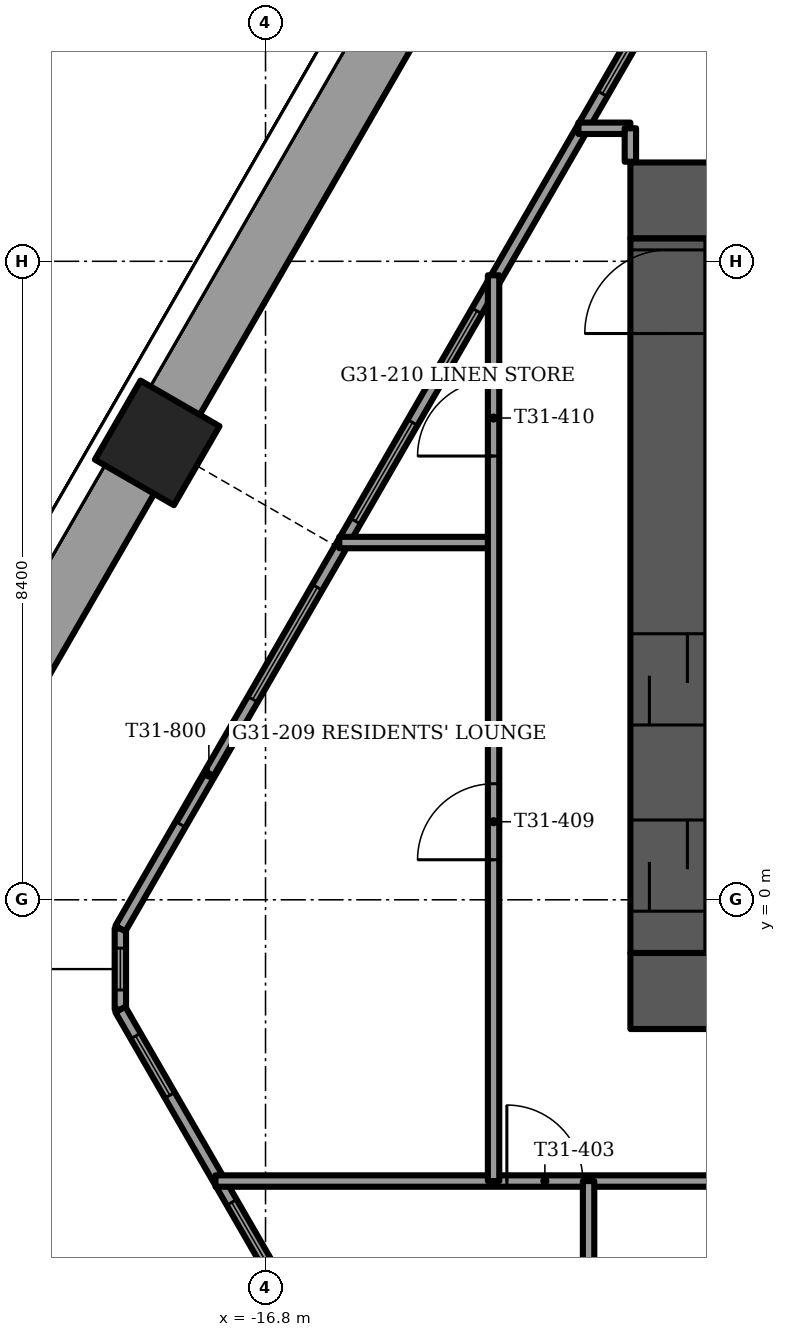
"""IFC4 building model, lengths in metres.
Left out: names, types, materials, properties, quantities, classifications, styles, units other than length and angle.
Written with IfcOpenShell. Run it as: python <this file> out.ifc"""

import sys

from ifc_helpers import new_model, si_unit, direction, frame, frame_2d, origin, origin_2d, place, context, subcontext, project, spatial, rectangle, extrude, element, fill, save


model = new_model("IFC4")
c1 = context("Model", 3, precision=1e-05, world=origin(), true_north=direction((0.0, 1.0)))
c2 = subcontext(c1, "Body", "Model", "MODEL_VIEW")
j1 = project(units=[si_unit("LENGTHUNIT", "METRE"), si_unit("PLANEANGLEUNIT", "RADIAN")], contexts=[c1])
p1 = place(None, origin())
s1 = spatial("IfcSite", under=j1, at=p1, CompositionType="ELEMENT")
p2 = place(p1, origin())
s2 = spatial("IfcBuilding", under=s1, at=p2, CompositionType="ELEMENT")
p3 = place(p2, frame((0.0, 0.0, 127.25)))
s3 = spatial("IfcBuildingStorey", under=s2, at=p3, CompositionType="ELEMENT", Elevation=127.25)
p4 = place(p3, frame((-18.225, 6.011, -1.2), z_axis=(0.0, 0.0, 1.0), x_axis=(0.5, 0.866025403784, 0.0)))
e1 = element("IfcColumn", 1, at=p4, inside=s3, PredefinedType="COLUMN", context=c2, shape_type="SweptSolid", body=[
    extrude(rectangle(XDim=1.2, YDim=1.2, at=origin_2d()), origin(), (0.0, 0.0, 1.0), 3.75),
])
p5 = place(p3, frame((-12.0, -1.2, -0.3), z_axis=(0.0, 0.0, 1.0), x_axis=(1.0, 0.0, 0.0)))
e2 = element("IfcWall", 2, at=p5, inside=s3, PredefinedType="SHEAR", context=c2, shape_type="SweptSolid", body=[
    extrude(rectangle(XDim=24.0, YDim=1.0, at=frame_2d((12.0, 0.0))), origin(), (0.0, 0.0, 1.0), 3.75),
])
p6 = place(p5, frame((11.2, 0.0, 0.0)))
e3 = element("IfcOpeningElement", 3, at=p6, cuts=e2, PredefinedType="OPENING", context=c2, shape_type="SweptSolid", body=[
    extrude(rectangle(XDim=1.6, YDim=2.1, at=frame_2d((0.8, 1.05))), frame((0.0, 0.5, 0.0), z_axis=(0.0, -1.0, 0.0), x_axis=(1.0, 0.0, 0.0)), (0.0, 0.0, 1.0), 1.0),
])
p7 = place(p3, frame((-12.0, 9.2, -0.3), z_axis=(0.0, 0.0, 1.0), x_axis=(1.0, 0.0, 0.0)))
e4 = element("IfcWall", 4, at=p7, inside=s3, PredefinedType="SHEAR", context=c2, shape_type="SweptSolid", body=[
    extrude(rectangle(XDim=24.0, YDim=1.0, at=frame_2d((12.0, 0.0))), origin(), (0.0, 0.0, 1.0), 3.75),
])
p8 = place(p7, frame((11.2, 0.0, 0.0)))
e5 = element("IfcOpeningElement", 5, at=p8, cuts=e4, PredefinedType="OPENING", context=c2, shape_type="SweptSolid", body=[
    extrude(rectangle(XDim=1.6, YDim=2.1, at=frame_2d((0.8, 1.05))), frame((0.0, 0.5, 0.0), z_axis=(0.0, -1.0, 0.0), x_axis=(1.0, 0.0, 0.0)), (0.0, 0.0, 1.0), 1.0),
])
p9 = place(p7, frame((5.25, 0.0, 0.0)))
e6 = element("IfcOpeningElement", 6, at=p9, cuts=e4, PredefinedType="OPENING", context=c2, shape_type="SweptSolid", body=[
    extrude(rectangle(XDim=1.1, YDim=2.1, at=frame_2d((0.55, 1.05))), frame((0.0, 0.5, 0.0), z_axis=(0.0, -1.0, 0.0), x_axis=(1.0, 0.0, 0.0)), (0.0, 0.0, 1.0), 1.0),
])
p10 = place(p7, frame((17.65, 0.0, 0.0)))
e7 = element("IfcOpeningElement", 7, at=p10, cuts=e4, PredefinedType="OPENING", context=c2, shape_type="SweptSolid", body=[
    extrude(rectangle(XDim=1.1, YDim=2.1, at=frame_2d((0.55, 1.05))), frame((0.0, 0.5, 0.0), z_axis=(0.0, -1.0, 0.0), x_axis=(1.0, 0.0, 0.0)), (0.0, 0.0, 1.0), 1.0),
])
p11 = place(p3, frame((-11.5, -0.7, -0.3), z_axis=(0.0, 0.0, 1.0), x_axis=(0.0, 1.0, 0.0)))
e8 = element("IfcWall", 8, at=p11, inside=s3, PredefinedType="SHEAR", context=c2, shape_type="SweptSolid", body=[
    extrude(rectangle(XDim=9.4, YDim=1.0, at=frame_2d((4.7, 0.0))), origin(), (0.0, 0.0, 1.0), 3.75),
])
p12 = place(p11, frame((8.15, 0.0, 0.0)))
e9 = element("IfcOpeningElement", 9, at=p12, cuts=e8, PredefinedType="OPENING", context=c2, shape_type="SweptSolid", body=[
    extrude(rectangle(XDim=1.1, YDim=2.1, at=frame_2d((0.55, 1.05))), frame((0.0, 0.5, 0.0), z_axis=(0.0, -1.0, 0.0), x_axis=(1.0, 0.0, 0.0)), (0.0, 0.0, 1.0), 1.0),
])
p13 = place(p11, frame((0.55, 0.0, 0.0)))
e10 = element("IfcOpeningElement", 10, at=p13, cuts=e8, PredefinedType="OPENING", context=c2, shape_type="SweptSolid", body=[
    extrude(rectangle(XDim=1.2, YDim=2.1, at=frame_2d((0.6, 1.05))), frame((0.0, 0.5, 0.0), z_axis=(0.0, -1.0, 0.0), x_axis=(1.0, 0.0, 0.0)), (0.0, 0.0, 1.0), 1.0),
])
p14 = place(p11, frame((3.0, 0.0, 0.0)))
e11 = element("IfcOpeningElement", 11, at=p14, cuts=e8, PredefinedType="OPENING", context=c2, shape_type="SweptSolid", body=[
    extrude(rectangle(XDim=1.2, YDim=2.1, at=frame_2d((0.6, 1.05))), frame((0.0, 0.5, 0.0), z_axis=(0.0, -1.0, 0.0), x_axis=(1.0, 0.0, 0.0)), (0.0, 0.0, 1.0), 1.0),
])
p15 = place(p3, frame((-14.733, 12.359, 0.0), z_axis=(0.0, 0.0, 1.0), x_axis=(-0.499999023957, -0.866025967302, 0.0)))
e12 = element("IfcWall", 12, at=p15, inside=s3, PredefinedType="PARAPET", context=c2, shape_type="SweptSolid", body=[
    extrude(rectangle(XDim=6.673, YDim=0.9, at=frame_2d((3.337, 0.0))), origin(), (0.0, 0.0, 1.0), 1.1),
])
p16 = place(p3, frame((-18.64, 5.593, 0.0), z_axis=(0.0, 0.0, 1.0), x_axis=(-0.500001814021, -0.866024356456, 0.0)))
e13 = element("IfcWall", 13, at=p16, inside=s3, PredefinedType="PARAPET", context=c2, shape_type="SweptSolid", body=[
    extrude(rectangle(XDim=6.859, YDim=0.9, at=frame_2d((3.429, 0.0))), origin(), (0.0, 0.0, 1.0), 1.1),
])
p17 = place(p3, frame((-22.069, -1.475, 0.0), z_axis=(0.0, 0.0, 1.0), x_axis=(0.499982573574, -0.866035464703, 0.0)))
e14 = element("IfcWall", 14, at=p17, inside=s3, PredefinedType="PARAPET", context=c2, shape_type="SweptSolid", body=[
    extrude(rectangle(XDim=5.281, YDim=0.9, at=frame_2d((2.641, 0.0))), origin(), (0.0, 0.0, 1.0), 1.1),
])
p18 = place(p3, frame((-7.642, 18.792, 0.0), z_axis=(0.0, 0.0, 1.0), x_axis=(-0.500001219746, -0.866024699562, 0.0)))
e15 = element("IfcWall", 15, at=p18, inside=s3, PredefinedType="SOLIDWALL", context=c2, shape_type="SweptSolid", body=[
    extrude(rectangle(XDim=22.137, YDim=0.15, at=frame_2d((11.068, 0.0))), origin(), (0.0, 0.0, 1.0), 3.45),
])
p19 = place(p18, frame((4.354, 0.0, 0.15)))
e16 = element("IfcOpeningElement", 16, at=p19, cuts=e15, PredefinedType="OPENING", context=c2, shape_type="SweptSolid", body=[
    extrude(rectangle(XDim=0.9, YDim=2.85, at=frame_2d((0.45, 1.425))), frame((0.0, 0.075, 0.0), z_axis=(0.0, -1.0, 0.0), x_axis=(1.0, 0.0, 0.0)), (0.0, 0.0, 1.0), 0.15),
])
p20 = place(p18, frame((6.454, 0.0, 0.15)))
e17 = element("IfcOpeningElement", 17, at=p20, cuts=e15, PredefinedType="OPENING", context=c2, shape_type="SweptSolid", body=[
    extrude(rectangle(XDim=1.5, YDim=2.85, at=frame_2d((0.75, 1.425))), frame((0.0, 0.075, 0.0), z_axis=(0.0, -1.0, 0.0), x_axis=(1.0, 0.0, 0.0)), (0.0, 0.0, 1.0), 0.15),
])
p21 = place(p18, frame((8.554, 0.0, 0.15)))
e18 = element("IfcOpeningElement", 18, at=p21, cuts=e15, PredefinedType="OPENING", context=c2, shape_type="SweptSolid", body=[
    extrude(rectangle(XDim=0.9, YDim=2.85, at=frame_2d((0.45, 1.425))), frame((0.0, 0.075, 0.0), z_axis=(0.0, -1.0, 0.0), x_axis=(1.0, 0.0, 0.0)), (0.0, 0.0, 1.0), 0.15),
])
p22 = place(p18, frame((12.754, 0.0, 0.15)))
e19 = element("IfcOpeningElement", 19, at=p22, cuts=e15, PredefinedType="OPENING", context=c2, shape_type="SweptSolid", body=[
    extrude(rectangle(XDim=0.9, YDim=2.85, at=frame_2d((0.45, 1.425))), frame((0.0, 0.075, 0.0), z_axis=(0.0, -1.0, 0.0), x_axis=(1.0, 0.0, 0.0)), (0.0, 0.0, 1.0), 0.15),
])
p23 = place(p18, frame((14.449, 0.0, 0.15)))
e20 = element("IfcOpeningElement", 20, at=p23, cuts=e15, PredefinedType="OPENING", context=c2, shape_type="SweptSolid", body=[
    extrude(rectangle(XDim=1.5, YDim=2.85, at=frame_2d((0.75, 1.425))), frame((0.0, 0.075, 0.0), z_axis=(0.0, -1.0, 0.0), x_axis=(1.0, 0.0, 0.0)), (0.0, 0.0, 1.0), 0.15),
])
p24 = place(p18, frame((16.954, 0.0, 0.15)))
e21 = element("IfcOpeningElement", 21, at=p24, cuts=e15, PredefinedType="OPENING", context=c2, shape_type="SweptSolid", body=[
    extrude(rectangle(XDim=1.7, YDim=2.85, at=frame_2d((0.85, 1.425))), frame((0.0, 0.075, 0.0), z_axis=(0.0, -1.0, 0.0), x_axis=(1.0, 0.0, 0.0)), (0.0, 0.0, 1.0), 0.15),
])
p25 = place(p18, frame((19.054, 0.0, 0.0)))
e22 = element("IfcOpeningElement", 22, at=p25, cuts=e15, PredefinedType="OPENING", context=c2, shape_type="SweptSolid", body=[
    extrude(rectangle(XDim=1.5, YDim=2.4, at=frame_2d((0.75, 1.2))), frame((0.0, 0.075, 0.0), z_axis=(0.0, -1.0, 0.0), x_axis=(1.0, 0.0, 0.0)), (0.0, 0.0, 1.0), 0.15),
])
p26 = place(p18, frame((1.021, 0.0, 0.15)))
e23 = element("IfcOpeningElement", 23, at=p26, cuts=e15, PredefinedType="OPENING", context=c2, shape_type="SweptSolid", body=[
    extrude(rectangle(XDim=1.7, YDim=2.73, at=frame_2d((0.85, 1.365))), frame((0.0, 0.075, 0.0), z_axis=(0.0, -1.0, 0.0), x_axis=(1.0, 0.0, 0.0)), (0.0, 0.0, 1.0), 0.15),
])
p27 = place(p3, frame((-18.71, -1.444, 0.0), z_axis=(0.0, 0.0, 1.0), x_axis=(0.500010582961, -0.866019293623, 0.0)))
e24 = element("IfcWall", 24, at=p27, inside=s3, PredefinedType="SOLIDWALL", context=c2, shape_type="SweptSolid", body=[
    extrude(rectangle(XDim=16.21, YDim=0.15, at=frame_2d((8.105, 0.0))), origin(), (0.0, 0.0, 1.0), 3.45),
])
p28 = place(p27, frame((2.93, 0.0, 0.15)))
e25 = element("IfcOpeningElement", 25, at=p28, cuts=e24, PredefinedType="OPENING", context=c2, shape_type="SweptSolid", body=[
    extrude(rectangle(XDim=0.9, YDim=2.85, at=frame_2d((0.45, 1.425))), frame((0.0, 0.075, 0.0), z_axis=(0.0, -1.0, 0.0), x_axis=(1.0, 0.0, 0.0)), (0.0, 0.0, 1.0), 0.15),
])
p29 = place(p27, frame((4.205, 0.0, 0.0)))
e26 = element("IfcOpeningElement", 26, at=p29, cuts=e24, PredefinedType="OPENING", context=c2, shape_type="SweptSolid", body=[
    extrude(rectangle(XDim=1.5, YDim=2.4, at=frame_2d((0.75, 1.2))), frame((0.0, 0.075, 0.0), z_axis=(0.0, -1.0, 0.0), x_axis=(1.0, 0.0, 0.0)), (0.0, 0.0, 1.0), 0.15),
])
p30 = place(p27, frame((6.305, 0.0, 0.15)))
e27 = element("IfcOpeningElement", 27, at=p30, cuts=e24, PredefinedType="OPENING", context=c2, shape_type="SweptSolid", body=[
    extrude(rectangle(XDim=1.7, YDim=2.85, at=frame_2d((0.85, 1.425))), frame((0.0, 0.075, 0.0), z_axis=(0.0, -1.0, 0.0), x_axis=(1.0, 0.0, 0.0)), (0.0, 0.0, 1.0), 0.15),
])
p31 = place(p27, frame((8.405, 0.0, 0.0)))
e28 = element("IfcOpeningElement", 28, at=p31, cuts=e24, PredefinedType="OPENING", context=c2, shape_type="SweptSolid", body=[
    extrude(rectangle(XDim=1.5, YDim=2.4, at=frame_2d((0.75, 1.2))), frame((0.0, 0.075, 0.0), z_axis=(0.0, -1.0, 0.0), x_axis=(1.0, 0.0, 0.0)), (0.0, 0.0, 1.0), 0.15),
])
p32 = place(p27, frame((10.505, 0.0, 0.15)))
e29 = element("IfcOpeningElement", 29, at=p32, cuts=e24, PredefinedType="OPENING", context=c2, shape_type="SweptSolid", body=[
    extrude(rectangle(XDim=1.7, YDim=2.85, at=frame_2d((0.85, 1.425))), frame((0.0, 0.075, 0.0), z_axis=(0.0, -1.0, 0.0), x_axis=(1.0, 0.0, 0.0)), (0.0, 0.0, 1.0), 0.15),
])
p33 = place(p27, frame((12.605, 0.0, 0.0)))
e30 = element("IfcOpeningElement", 30, at=p33, cuts=e24, PredefinedType="OPENING", context=c2, shape_type="SweptSolid", body=[
    extrude(rectangle(XDim=1.5, YDim=2.4, at=frame_2d((0.75, 1.2))), frame((0.0, 0.075, 0.0), z_axis=(0.0, -1.0, 0.0), x_axis=(1.0, 0.0, 0.0)), (0.0, 0.0, 1.0), 0.15),
])
p34 = place(p27, frame((0.402, 0.0, 0.15)))
e31 = element("IfcOpeningElement", 31, at=p34, cuts=e24, PredefinedType="OPENING", context=c2, shape_type="SweptSolid", body=[
    extrude(rectangle(XDim=0.9, YDim=2.73, at=frame_2d((0.45, 1.365))), frame((0.0, 0.075, 0.0), z_axis=(0.0, -1.0, 0.0), x_axis=(1.0, 0.0, 0.0)), (0.0, 0.0, 1.0), 0.15),
])
p35 = place(p27, frame((14.907, 0.0, 0.15)))
e32 = element("IfcOpeningElement", 32, at=p35, cuts=e24, PredefinedType="OPENING", context=c2, shape_type="SweptSolid", body=[
    extrude(rectangle(XDim=0.9, YDim=2.73, at=frame_2d((0.45, 1.365))), frame((0.0, 0.075, 0.0), z_axis=(0.0, -1.0, 0.0), x_axis=(1.0, 0.0, 0.0)), (0.0, 0.0, 1.0), 0.15),
])
p36 = place(p3, frame((-18.71, -0.378, 0.0), z_axis=(0.0, 0.0, 1.0), x_axis=(0.0, -1.0, 0.0)))
e33 = element("IfcWall", 33, at=p36, inside=s3, PredefinedType="SOLIDWALL", context=c2, shape_type="SweptSolid", body=[
    extrude(rectangle(XDim=1.065, YDim=0.15, at=frame_2d((0.533, 0.0))), origin(), (0.0, 0.0, 1.0), 3.45),
])
p37 = place(p36, frame((0.258, 0.0, 0.15)))
e34 = element("IfcOpeningElement", 34, at=p37, cuts=e33, PredefinedType="OPENING", context=c2, shape_type="SweptSolid", body=[
    extrude(rectangle(XDim=0.55, YDim=2.85, at=frame_2d((0.275, 1.425))), frame((0.0, 0.075, 0.0), z_axis=(0.0, -1.0, 0.0), x_axis=(1.0, 0.0, 0.0)), (0.0, 0.0, 1.0), 0.15),
])
p38 = place(p3, frame((-17.459, -3.7, 0.0), z_axis=(0.0, 0.0, 1.0), x_axis=(1.0, 0.0, 0.0)))
e35 = element("IfcWall", 35, at=p38, inside=s3, PredefinedType="PARTITIONING", context=c2, shape_type="SweptSolid", body=[
    extrude(rectangle(XDim=8.299, YDim=0.15, at=frame_2d((4.149, 0.0))), origin(), (0.0, 0.0, 1.0), 3.45),
])
p39 = place(p38, frame((3.834, 0.0, 0.0)))
e36 = element("IfcOpeningElement", 36, at=p39, cuts=e35, PredefinedType="OPENING", context=c2, shape_type="SweptSolid", body=[
    extrude(rectangle(XDim=1.0, YDim=2.1, at=frame_2d((0.5, 1.05))), frame((0.0, 0.075, 0.0), z_axis=(0.0, -1.0, 0.0), x_axis=(1.0, 0.0, 0.0)), (0.0, 0.0, 1.0), 0.15),
])
p40 = place(p3, frame((-15.83, 4.7, 0.0), z_axis=(0.0, 0.0, 1.0), x_axis=(1.0, 0.0, 0.0)))
e37 = element("IfcWall", 37, at=p40, inside=s3, PredefinedType="PARTITIONING", context=c2, shape_type="SweptSolid", body=[
    extrude(rectangle(XDim=2.03, YDim=0.15, at=frame_2d((1.015, 0.0))), origin(), (0.0, 0.0, 1.0), 3.45),
])
p41 = place(p3, frame((-12.683, 10.15, 0.0), z_axis=(0.0, 0.0, 1.0), x_axis=(1.0, 0.0, 0.0)))
e38 = element("IfcWall", 38, at=p41, inside=s3, PredefinedType="PARTITIONING", context=c2, shape_type="SweptSolid", body=[
    extrude(rectangle(XDim=0.683, YDim=0.15, at=frame_2d((0.342, 0.0))), origin(), (0.0, 0.0, 1.0), 3.45),
])
p42 = place(p3, frame((-12.0, 9.71, 0.0), z_axis=(0.0, 0.0, 1.0), x_axis=(0.0, 1.0, 0.0)))
e39 = element("IfcWall", 39, at=p42, inside=s3, PredefinedType="PARTITIONING", context=c2, shape_type="SweptSolid", body=[
    extrude(rectangle(XDim=0.44, YDim=0.15, at=frame_2d((0.22, 0.0))), origin(), (0.0, 0.0, 1.0), 3.45),
])
p43 = place(p3, frame((-12.55, -7.3, 0.0), z_axis=(0.0, 0.0, 1.0), x_axis=(0.0, 1.0, 0.0)))
e40 = element("IfcWall", 40, at=p43, inside=s3, PredefinedType="PARTITIONING", context=c2, shape_type="SweptSolid", body=[
    extrude(rectangle(XDim=3.6, YDim=0.15, at=frame_2d((1.8, 0.0))), origin(), (0.0, 0.0, 1.0), 3.45),
])
p44 = place(p43, frame((1.4, 0.0, 0.0)))
e41 = element("IfcOpeningElement", 41, at=p44, cuts=e40, PredefinedType="OPENING", context=c2, shape_type="SweptSolid", body=[
    extrude(rectangle(XDim=0.8, YDim=2.1, at=frame_2d((0.4, 1.05))), frame((0.0, 0.075, 0.0), z_axis=(0.0, -1.0, 0.0), x_axis=(1.0, 0.0, 0.0)), (0.0, 0.0, 1.0), 0.15),
])
p45 = place(p3, frame((-13.8, -3.7, 0.0), z_axis=(0.0, 0.0, 1.0), x_axis=(0.0, 1.0, 0.0)))
e42 = element("IfcWall", 42, at=p45, inside=s3, PredefinedType="PARTITIONING", context=c2, shape_type="SweptSolid", body=[
    extrude(rectangle(XDim=11.916, YDim=0.15, at=frame_2d((5.958, 0.0))), origin(), (0.0, 0.0, 1.0), 3.45),
])
p46 = place(p45, frame((4.227, 0.0, 0.0)))
e43 = element("IfcOpeningElement", 43, at=p46, cuts=e42, PredefinedType="OPENING", context=c2, shape_type="SweptSolid", body=[
    extrude(rectangle(XDim=1.0, YDim=2.1, at=frame_2d((0.5, 1.05))), frame((0.0, 0.075, 0.0), z_axis=(0.0, -1.0, 0.0), x_axis=(1.0, 0.0, 0.0)), (0.0, 0.0, 1.0), 0.15),
])
p47 = place(p45, frame((9.538, 0.0, 0.0)))
e44 = element("IfcOpeningElement", 44, at=p47, cuts=e42, PredefinedType="OPENING", context=c2, shape_type="SweptSolid", body=[
    extrude(rectangle(XDim=1.0, YDim=2.1, at=frame_2d((0.5, 1.05))), frame((0.0, 0.075, 0.0), z_axis=(0.0, -1.0, 0.0), x_axis=(1.0, 0.0, 0.0)), (0.0, 0.0, 1.0), 0.15),
])
p48 = place(p21, origin())
e45 = element("IfcWindow", 45, at=p48, inside=s3, PartitioningType="SINGLE_PANEL", PredefinedType="WINDOW", context=c2, shape_type="SweptSolid", body=[
    extrude(rectangle(XDim=0.9, YDim=2.85, at=frame_2d((0.45, 1.425))), frame((0.0, 0.03, 0.0), z_axis=(0.0, -1.0, 0.0), x_axis=(1.0, 0.0, 0.0)), (0.0, 0.0, 1.0), 0.06),
])
fill(e18, e45)
p49 = place(p22, origin())
e46 = element("IfcWindow", 46, at=p49, inside=s3, PartitioningType="SINGLE_PANEL", PredefinedType="WINDOW", context=c2, shape_type="SweptSolid", body=[
    extrude(rectangle(XDim=0.9, YDim=2.85, at=frame_2d((0.45, 1.425))), frame((0.0, 0.03, 0.0), z_axis=(0.0, -1.0, 0.0), x_axis=(1.0, 0.0, 0.0)), (0.0, 0.0, 1.0), 0.06),
])
fill(e19, e46)
p50 = place(p23, origin())
e47 = element("IfcWindow", 47, at=p50, inside=s3, PartitioningType="SINGLE_PANEL", PredefinedType="WINDOW", context=c2, shape_type="SweptSolid", body=[
    extrude(rectangle(XDim=1.5, YDim=2.85, at=frame_2d((0.75, 1.425))), frame((0.0, 0.03, 0.0), z_axis=(0.0, -1.0, 0.0), x_axis=(1.0, 0.0, 0.0)), (0.0, 0.0, 1.0), 0.06),
])
fill(e20, e47)
p51 = place(p24, origin())
e48 = element("IfcWindow", 48, at=p51, inside=s3, PartitioningType="SINGLE_PANEL", PredefinedType="WINDOW", context=c2, shape_type="SweptSolid", body=[
    extrude(rectangle(XDim=1.7, YDim=2.85, at=frame_2d((0.85, 1.425))), frame((0.0, 0.03, 0.0), z_axis=(0.0, -1.0, 0.0), x_axis=(1.0, 0.0, 0.0)), (0.0, 0.0, 1.0), 0.06),
])
fill(e21, e48)
p52 = place(p25, origin())
e49 = element("IfcDoor", 49, at=p52, inside=s3, OperationType="SLIDING_TO_RIGHT", PredefinedType="DOOR", context=c2, shape_type="SweptSolid", body=[
    extrude(rectangle(XDim=1.5, YDim=2.4, at=frame_2d((0.75, 1.2))), frame((0.0, 0.025, 0.0), z_axis=(0.0, -1.0, 0.0), x_axis=(1.0, 0.0, 0.0)), (0.0, 0.0, 1.0), 0.05),
])
fill(e22, e49)
p53 = place(p28, origin())
e50 = element("IfcWindow", 50, at=p53, inside=s3, PartitioningType="SINGLE_PANEL", PredefinedType="WINDOW", context=c2, shape_type="SweptSolid", body=[
    extrude(rectangle(XDim=0.9, YDim=2.85, at=frame_2d((0.45, 1.425))), frame((0.0, 0.03, 0.0), z_axis=(0.0, -1.0, 0.0), x_axis=(1.0, 0.0, 0.0)), (0.0, 0.0, 1.0), 0.06),
])
fill(e25, e50)
p54 = place(p34, origin())
e51 = element("IfcWindow", 51, at=p54, inside=s3, PartitioningType="SINGLE_PANEL", PredefinedType="WINDOW", context=c2, shape_type="SweptSolid", body=[
    extrude(rectangle(XDim=0.9, YDim=2.73, at=frame_2d((0.45, 1.365))), frame((0.0, 0.03, 0.0), z_axis=(0.0, -1.0, 0.0), x_axis=(1.0, 0.0, 0.0)), (0.0, 0.0, 1.0), 0.06),
])
fill(e31, e51)
p55 = place(p37, origin())
e52 = element("IfcWindow", 52, at=p55, inside=s3, PartitioningType="SINGLE_PANEL", PredefinedType="WINDOW", context=c2, shape_type="SweptSolid", body=[
    extrude(rectangle(XDim=0.55, YDim=2.85, at=frame_2d((0.275, 1.425))), frame((0.0, 0.03, 0.0), z_axis=(0.0, -1.0, 0.0), x_axis=(1.0, 0.0, 0.0)), (0.0, 0.0, 1.0), 0.06),
])
fill(e34, e52)
p56 = place(p12, origin())
e53 = element("IfcDoor", 53, at=p56, inside=s3, OperationType="SINGLE_SWING_LEFT", PredefinedType="DOOR", context=c2, shape_type="SweptSolid", body=[
    extrude(rectangle(XDim=1.1, YDim=2.1, at=frame_2d((0.55, 1.05))), frame((0.0, 0.025, 0.0), z_axis=(0.0, -1.0, 0.0), x_axis=(1.0, 0.0, 0.0)), (0.0, 0.0, 1.0), 0.05),
])
fill(e9, e53)
p57 = place(p13, origin())
e54 = element("IfcDoor", 54, at=p57, inside=s3, OperationType="SLIDING_TO_LEFT", PredefinedType="DOOR", context=c2, shape_type="SweptSolid", body=[
    extrude(rectangle(XDim=1.2, YDim=2.1, at=frame_2d((0.6, 1.05))), frame((0.0, 0.025, 0.0), z_axis=(0.0, -1.0, 0.0), x_axis=(1.0, 0.0, 0.0)), (0.0, 0.0, 1.0), 0.05),
])
fill(e10, e54)
p58 = place(p14, origin())
e55 = element("IfcDoor", 55, at=p58, inside=s3, OperationType="SLIDING_TO_LEFT", PredefinedType="DOOR", context=c2, shape_type="SweptSolid", body=[
    extrude(rectangle(XDim=1.2, YDim=2.1, at=frame_2d((0.6, 1.05))), frame((0.0, 0.025, 0.0), z_axis=(0.0, -1.0, 0.0), x_axis=(1.0, 0.0, 0.0)), (0.0, 0.0, 1.0), 0.05),
])
fill(e11, e55)
p59 = place(p39, origin())
e56 = element("IfcDoor", 56, at=p59, inside=s3, OperationType="SINGLE_SWING_LEFT", PredefinedType="DOOR", context=c2, shape_type="SweptSolid", body=[
    extrude(rectangle(XDim=1.0, YDim=2.1, at=frame_2d((0.5, 1.05))), frame((0.0, 0.025, 0.0), z_axis=(0.0, -1.0, 0.0), x_axis=(1.0, 0.0, 0.0)), (0.0, 0.0, 1.0), 0.05),
])
fill(e36, e56)
p60 = place(p46, origin())
e57 = element("IfcDoor", 57, at=p60, inside=s3, OperationType="SINGLE_SWING_LEFT", PredefinedType="DOOR", context=c2, shape_type="SweptSolid", body=[
    extrude(rectangle(XDim=1.0, YDim=2.1, at=frame_2d((0.5, 1.05))), frame((0.0, 0.025, 0.0), z_axis=(0.0, -1.0, 0.0), x_axis=(1.0, 0.0, 0.0)), (0.0, 0.0, 1.0), 0.05),
])
fill(e43, e57)
p61 = place(p47, origin())
e58 = element("IfcDoor", 58, at=p61, inside=s3, OperationType="SINGLE_SWING_LEFT", PredefinedType="DOOR", context=c2, shape_type="SweptSolid", body=[
    extrude(rectangle(XDim=1.0, YDim=2.1, at=frame_2d((0.5, 1.05))), frame((0.0, 0.025, 0.0), z_axis=(0.0, -1.0, 0.0), x_axis=(1.0, 0.0, 0.0)), (0.0, 0.0, 1.0), 0.05),
])
fill(e44, e58)
save(model, sys.argv[1])
